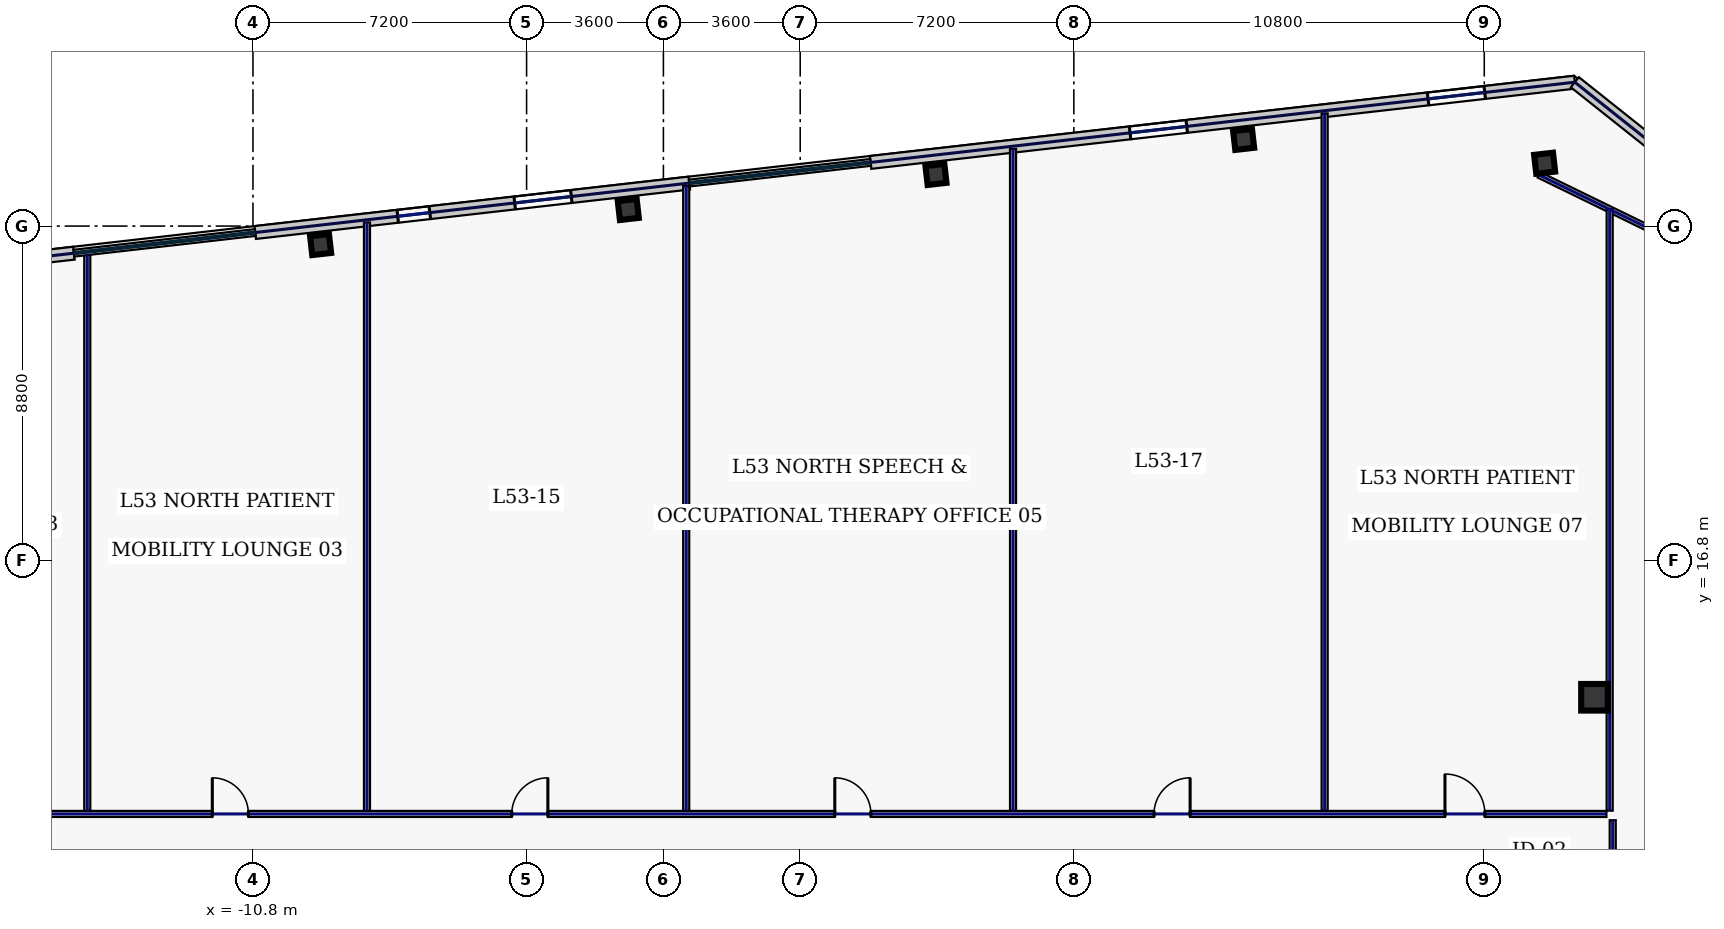
"""IFC4 building model, lengths in metres.
Left out: names, types, materials, properties, quantities, classifications, styles, units other than length and angle.
Written with IfcOpenShell. Run it as: python <this file> out.ifc"""

import sys

from ifc_helpers import new_model, si_unit, direction, frame, frame_2d, origin, origin_2d, place, context, subcontext, project, spatial, rectangle, hollow_rectangle, extrude, element, fill, save


model = new_model("IFC4")
c1 = context("Model", 3, precision=1e-05, world=origin(), true_north=direction((0.0, 1.0)))
c2 = subcontext(c1, "Body", "Model", "MODEL_VIEW")
j1 = project(units=[si_unit("LENGTHUNIT", "METRE"), si_unit("PLANEANGLEUNIT", "RADIAN")], contexts=[c1])
p1 = place(None, origin())
s1 = spatial("IfcSite", under=j1, at=p1, CompositionType="ELEMENT")
p2 = place(p1, origin())
s2 = spatial("IfcBuilding", under=s1, at=p2, CompositionType="ELEMENT")
p3 = place(p2, frame((0.0, 0.0, 230.2)))
s3 = spatial("IfcBuildingStorey", under=s2, at=p3, CompositionType="ELEMENT", Elevation=230.2)
p4 = place(p3, frame((24.5, 13.2, 0.0), z_axis=(0.0, 0.0, 1.0), x_axis=(1.0, 0.0, 0.0)))
e1 = element("IfcColumn", 1, at=p4, inside=s3, PredefinedType="COLUMN", context=c2, shape_type="SweptSolid", body=[
    extrude(hollow_rectangle(XDim=0.7, YDim=0.7, WallThickness=0.032, at=origin_2d()), origin(), (0.0, 0.0, 1.0), 3.74),
])
for number, where, z_axis, x_axis in (
    (2, (23.188, 27.253, 0.0), (0.0, 0.0, 1.0), (0.994, 0.113, 0.0)),
    (3, (15.269, 27.88, 0.0), (0.0, 0.0, 1.0), (0.994, 0.113, 0.0)),
    (4, (7.172, 26.958, 0.0), (0.0, 0.0, 1.0), (0.994, 0.113, 0.0)),
    (5, (-0.924, 26.035, 0.0), (0.0, 0.0, 1.0), (0.994, 0.113, 0.0)),
    (6, (-9.02, 25.113, 0.0), (0.0, 0.0, 1.0), (0.994, 0.113, 0.0)),
):
    element("IfcColumn", number, at=place(p3, frame(where, z_axis=z_axis, x_axis=x_axis)), inside=s3, PredefinedType="COLUMN", context=c2, shape_type="SweptSolid", body=[
        extrude(hollow_rectangle(XDim=0.5, YDim=0.5, WallThickness=0.025, at=origin_2d()), origin(), (0.0, 0.0, 1.0), 3.74),
    ])
p5 = place(p3, frame((23.983, 29.386, 0.0), z_axis=(0.0, 0.0, 1.0), x_axis=(-0.993572271362, -0.113199565282, 0.0)))
e7 = element("IfcWall", 7, at=p5, inside=s3, PredefinedType="STANDARD", context=c2, shape_type="SweptSolid", body=[
    extrude(rectangle(XDim=18.651, YDim=0.34, at=frame_2d((9.326, 0.0))), origin(), (0.0, 0.0, 1.0), 3.74),
])
p6 = place(p5, frame((10.279, 0.0, 0.83)))
e8 = element("IfcOpeningElement", 8, at=p6, cuts=e7, PredefinedType="OPENING", context=c2, shape_type="SweptSolid", body=[
    extrude(rectangle(XDim=1.5, YDim=2.0, at=frame_2d((0.75, 1.0))), frame((0.0, 0.18, 0.0), z_axis=(0.0, -1.0, 0.0), x_axis=(1.0, 0.0, 0.0)), (0.0, 0.0, 1.0), 0.36),
])
p7 = place(p5, frame((2.386, 0.0, 0.83)))
e9 = element("IfcOpeningElement", 9, at=p7, cuts=e7, PredefinedType="OPENING", context=c2, shape_type="SweptSolid", body=[
    extrude(rectangle(XDim=1.5, YDim=2.0, at=frame_2d((0.75, 1.0))), frame((0.0, 0.18, 0.0), z_axis=(0.0, -1.0, 0.0), x_axis=(1.0, 0.0, 0.0)), (0.0, 0.0, 1.0), 0.36),
])
p8 = place(p3, frame((0.682, 26.731, 0.0), z_axis=(0.0, 0.0, 1.0), x_axis=(-0.993571968199, -0.113202226169, 0.0)))
e10 = element("IfcWall", 10, at=p8, inside=s3, PredefinedType="STANDARD", context=c2, shape_type="SweptSolid", body=[
    extrude(rectangle(XDim=11.497, YDim=0.34, at=frame_2d((5.749, 0.0))), origin(), (0.0, 0.0, 1.0), 3.74),
])
p9 = place(p8, frame((6.873, 0.0, 0.83)))
e11 = element("IfcOpeningElement", 11, at=p9, cuts=e10, PredefinedType="OPENING", context=c2, shape_type="SweptSolid", body=[
    extrude(rectangle(XDim=0.85, YDim=1.85, at=frame_2d((0.425, 0.925))), frame((0.0, 0.18, 0.0), z_axis=(0.0, -1.0, 0.0), x_axis=(1.0, 0.0, 0.0)), (0.0, 0.0, 1.0), 0.36),
])
p10 = place(p8, frame((3.125, 0.0, 0.83)))
e12 = element("IfcOpeningElement", 12, at=p10, cuts=e10, PredefinedType="OPENING", context=c2, shape_type="SweptSolid", body=[
    extrude(rectangle(XDim=1.5, YDim=2.0, at=frame_2d((0.75, 1.0))), frame((0.0, 0.18, 0.0), z_axis=(0.0, -1.0, 0.0), x_axis=(1.0, 0.0, 0.0)), (0.0, 0.0, 1.0), 0.36),
])
p11 = place(p3, frame((-15.51, 24.886, 0.0), z_axis=(0.0, 0.0, 1.0), x_axis=(-0.993572271362, -0.113199565282, 0.0)))
e13 = element("IfcWall", 13, at=p11, inside=s3, PredefinedType="STANDARD", context=c2, shape_type="SweptSolid", body=[
    extrude(rectangle(XDim=18.651, YDim=0.34, at=frame_2d((9.326, 0.0))), origin(), (0.0, 0.0, 1.0), 3.74),
])
p12 = place(p11, frame((15.021, 0.0, 0.83)))
e14 = element("IfcOpeningElement", 14, at=p12, cuts=e13, PredefinedType="OPENING", context=c2, shape_type="SweptSolid", body=[
    extrude(rectangle(XDim=1.5, YDim=2.0, at=frame_2d((0.75, 1.0))), frame((0.0, 0.18, 0.0), z_axis=(0.0, -1.0, 0.0), x_axis=(1.0, 0.0, 0.0)), (0.0, 0.0, 1.0), 0.36),
])
p13 = place(p11, frame((11.273, 0.0, 0.83)))
e15 = element("IfcOpeningElement", 15, at=p13, cuts=e13, PredefinedType="OPENING", context=c2, shape_type="SweptSolid", body=[
    extrude(rectangle(XDim=1.5, YDim=2.0, at=frame_2d((0.75, 1.0))), frame((0.0, 0.18, 0.0), z_axis=(0.0, -1.0, 0.0), x_axis=(1.0, 0.0, 0.0)), (0.0, 0.0, 1.0), 0.36),
])
p14 = place(p11, frame((6.873, 0.0, 0.83)))
e16 = element("IfcOpeningElement", 16, at=p14, cuts=e13, PredefinedType="OPENING", context=c2, shape_type="SweptSolid", body=[
    extrude(rectangle(XDim=1.5, YDim=2.0, at=frame_2d((0.75, 1.0))), frame((0.0, 0.18, 0.0), z_axis=(0.0, -1.0, 0.0), x_axis=(1.0, 0.0, 0.0)), (0.0, 0.0, 1.0), 0.36),
])
p15 = place(p11, frame((3.125, 0.0, 0.83)))
e17 = element("IfcOpeningElement", 17, at=p15, cuts=e13, PredefinedType="OPENING", context=c2, shape_type="SweptSolid", body=[
    extrude(rectangle(XDim=0.85, YDim=1.85, at=frame_2d((0.425, 0.925))), frame((0.0, 0.18, 0.0), z_axis=(0.0, -1.0, 0.0), x_axis=(1.0, 0.0, 0.0)), (0.0, 0.0, 1.0), 0.36),
])
p16 = place(p3, frame((29.107, 25.31, 0.0), z_axis=(0.0, 0.0, 1.0), x_axis=(-0.78259733853, 0.62252823689, 0.0)))
e18 = element("IfcWall", 18, at=p16, inside=s3, PredefinedType="STANDARD", context=c2, shape_type="SweptSolid", body=[
    extrude(rectangle(XDim=6.548, YDim=0.34, at=frame_2d((3.274, 0.0))), origin(), (0.0, 0.0, 1.0), 3.74),
])
p17 = place(p3, frame((28.528, 24.271, 0.0), z_axis=(0.0, 0.0, 1.0), x_axis=(-0.898820692789, 0.438316509173, 0.0)))
e19 = element("IfcWall", 19, at=p17, inside=s3, PredefinedType="PARTITIONING", context=c2, shape_type="SweptSolid", body=[
    extrude(rectangle(XDim=6.107, YDim=0.16, at=frame_2d((3.053, 0.0))), origin(), (0.0, 0.0, 1.0), 3.74),
])
p18 = place(p3, frame((-24.815, 10.13, 0.0), z_axis=(0.0, 0.0, 1.0), x_axis=(1.0, 0.0, 0.0)))
e20 = element("IfcWall", 20, at=p18, inside=s3, PredefinedType="PARTITIONING", context=c2, shape_type="SweptSolid", body=[
    extrude(rectangle(XDim=49.63, YDim=0.16, at=frame_2d((24.815, 0.0))), origin(), (0.0, 0.0, 1.0), 3.74),
])
p19 = place(p18, frame((2.044, 0.0, 0.0)))
e21 = element("IfcOpeningElement", 21, at=p19, cuts=e20, PredefinedType="OPENING", context=c2, shape_type="SweptSolid", body=[
    extrude(rectangle(XDim=0.95, YDim=2.2, at=frame_2d((0.475, 1.1))), frame((0.0, 0.09, 0.0), z_axis=(0.0, -1.0, 0.0), x_axis=(1.0, 0.0, 0.0)), (0.0, 0.0, 1.0), 0.18),
])
p20 = place(p18, frame((6.72, 0.0, 0.0)))
e22 = element("IfcOpeningElement", 22, at=p20, cuts=e20, PredefinedType="OPENING", context=c2, shape_type="SweptSolid", body=[
    extrude(rectangle(XDim=1.05, YDim=2.2, at=frame_2d((0.525, 1.1))), frame((0.0, 0.09, 0.0), z_axis=(0.0, -1.0, 0.0), x_axis=(1.0, 0.0, 0.0)), (0.0, 0.0, 1.0), 0.18),
])
p21 = place(p18, frame((12.945, 0.0, 0.0)))
e23 = element("IfcOpeningElement", 23, at=p21, cuts=e20, PredefinedType="OPENING", context=c2, shape_type="SweptSolid", body=[
    extrude(rectangle(XDim=0.95, YDim=2.2, at=frame_2d((0.475, 1.1))), frame((0.0, 0.09, 0.0), z_axis=(0.0, -1.0, 0.0), x_axis=(1.0, 0.0, 0.0)), (0.0, 0.0, 1.0), 0.18),
])
p22 = place(p18, frame((20.825, 0.0, 0.0)))
e24 = element("IfcOpeningElement", 24, at=p22, cuts=e20, PredefinedType="OPENING", context=c2, shape_type="SweptSolid", body=[
    extrude(rectangle(XDim=0.95, YDim=2.2, at=frame_2d((0.475, 1.1))), frame((0.0, 0.09, 0.0), z_axis=(0.0, -1.0, 0.0), x_axis=(1.0, 0.0, 0.0)), (0.0, 0.0, 1.0), 0.18),
])
p23 = place(p18, frame((29.325, 0.0, 0.0)))
e25 = element("IfcOpeningElement", 25, at=p23, cuts=e20, PredefinedType="OPENING", context=c2, shape_type="SweptSolid", body=[
    extrude(rectangle(XDim=0.95, YDim=2.2, at=frame_2d((0.475, 1.1))), frame((0.0, 0.09, 0.0), z_axis=(0.0, -1.0, 0.0), x_axis=(1.0, 0.0, 0.0)), (0.0, 0.0, 1.0), 0.18),
])
p24 = place(p18, frame((37.725, 0.0, 0.0)))
e26 = element("IfcOpeningElement", 26, at=p24, cuts=e20, PredefinedType="OPENING", context=c2, shape_type="SweptSolid", body=[
    extrude(rectangle(XDim=0.95, YDim=2.2, at=frame_2d((0.475, 1.1))), frame((0.0, 0.09, 0.0), z_axis=(0.0, -1.0, 0.0), x_axis=(1.0, 0.0, 0.0)), (0.0, 0.0, 1.0), 0.18),
])
p25 = place(p18, frame((45.381, 0.0, 0.0)))
e27 = element("IfcOpeningElement", 27, at=p25, cuts=e20, PredefinedType="OPENING", context=c2, shape_type="SweptSolid", body=[
    extrude(rectangle(XDim=1.05, YDim=2.2, at=frame_2d((0.525, 1.1))), frame((0.0, 0.09, 0.0), z_axis=(0.0, -1.0, 0.0), x_axis=(1.0, 0.0, 0.0)), (0.0, 0.0, 1.0), 0.18),
])
p26 = place(p3, frame((24.98, 9.965, 0.0), z_axis=(0.0, 0.0, 1.0), x_axis=(0.0, -1.0, 0.0)))
e28 = element("IfcWall", 28, at=p26, inside=s3, PredefinedType="PARTITIONING", context=c2, shape_type="SweptSolid", body=[
    extrude(rectangle(XDim=2.98, YDim=0.16, at=frame_2d((1.49, 0.0))), origin(), (0.0, 0.0, 1.0), 3.74),
])
p27 = place(p26, frame((1.1, 0.0, 0.0)))
e29 = element("IfcOpeningElement", 29, at=p27, cuts=e28, PredefinedType="OPENING", context=c2, shape_type="SweptSolid", body=[
    extrude(rectangle(XDim=0.95, YDim=2.2, at=frame_2d((0.475, 1.1))), frame((0.0, 0.09, 0.0), z_axis=(0.0, -1.0, 0.0), x_axis=(1.0, 0.0, 0.0)), (0.0, 0.0, 1.0), 0.18),
])
p28 = place(p3, frame((24.9, 10.215, 0.0), z_axis=(0.0, 0.0, 1.0), x_axis=(0.0, 1.0, 0.0)))
e30 = element("IfcWall", 30, at=p28, inside=s3, PredefinedType="PARTITIONING", context=c2, shape_type="SweptSolid", body=[
    extrude(rectangle(XDim=15.829, YDim=0.16, at=frame_2d((7.915, 0.0))), origin(), (0.0, 0.0, 1.0), 3.74),
])
p29 = place(p3, frame((-15.16, 10.215, 0.0), z_axis=(0.0, 0.0, 1.0), x_axis=(0.0, 1.0, 0.0)))
e31 = element("IfcWall", 31, at=p29, inside=s3, PredefinedType="PARTITIONING", context=c2, shape_type="SweptSolid", body=[
    extrude(rectangle(XDim=14.641, YDim=0.16, at=frame_2d((7.32, 0.0))), origin(), (0.0, 0.0, 1.0), 3.74),
])
p30 = place(p3, frame((-7.8, 10.215, 0.0), z_axis=(0.0, 0.0, 1.0), x_axis=(0.0, 1.0, 0.0)))
e32 = element("IfcWall", 32, at=p30, inside=s3, PredefinedType="PARTITIONING", context=c2, shape_type="SweptSolid", body=[
    extrude(rectangle(XDim=15.479, YDim=0.16, at=frame_2d((7.74, 0.0))), origin(), (0.0, 0.0, 1.0), 3.74),
])
p31 = place(p3, frame((0.6, 10.215, 0.0), z_axis=(0.0, 0.0, 1.0), x_axis=(0.0, 1.0, 0.0)))
e33 = element("IfcWall", 33, at=p31, inside=s3, PredefinedType="PARTITIONING", context=c2, shape_type="SweptSolid", body=[
    extrude(rectangle(XDim=16.437, YDim=0.16, at=frame_2d((8.218, 0.0))), origin(), (0.0, 0.0, 1.0), 3.74),
])
p32 = place(p3, frame((9.2, 10.215, 0.0), z_axis=(0.0, 0.0, 1.0), x_axis=(0.0, 1.0, 0.0)))
e34 = element("IfcWall", 34, at=p32, inside=s3, PredefinedType="PARTITIONING", context=c2, shape_type="SweptSolid", body=[
    extrude(rectangle(XDim=17.417, YDim=0.16, at=frame_2d((8.708, 0.0))), origin(), (0.0, 0.0, 1.0), 3.74),
])
p33 = place(p3, frame((17.4, 10.215, 0.0), z_axis=(0.0, 0.0, 1.0), x_axis=(0.0, 1.0, 0.0)))
e35 = element("IfcWall", 35, at=p33, inside=s3, PredefinedType="PARTITIONING", context=c2, shape_type="SweptSolid", body=[
    extrude(rectangle(XDim=18.351, YDim=0.16, at=frame_2d((9.175, 0.0))), origin(), (0.0, 0.0, 1.0), 3.74),
])
p34 = place(p6, origin())
e36 = element("IfcWindow", 36, at=p34, inside=s3, PartitioningType="SINGLE_PANEL", PredefinedType="WINDOW", context=c2, shape_type="SweptSolid", body=[
    extrude(rectangle(XDim=1.5, YDim=2.0, at=frame_2d((0.75, 1.0))), frame((0.0, 0.03, 0.0), z_axis=(0.0, -1.0, 0.0), x_axis=(1.0, 0.0, 0.0)), (0.0, 0.0, 1.0), 0.06),
])
fill(e8, e36)
p35 = place(p7, origin())
e37 = element("IfcWindow", 37, at=p35, inside=s3, PartitioningType="SINGLE_PANEL", PredefinedType="WINDOW", context=c2, shape_type="SweptSolid", body=[
    extrude(rectangle(XDim=1.5, YDim=2.0, at=frame_2d((0.75, 1.0))), frame((0.0, 0.03, 0.0), z_axis=(0.0, -1.0, 0.0), x_axis=(1.0, 0.0, 0.0)), (0.0, 0.0, 1.0), 0.06),
])
fill(e9, e37)
p36 = place(p9, origin())
e38 = element("IfcWindow", 38, at=p36, inside=s3, PartitioningType="SINGLE_PANEL", PredefinedType="WINDOW", context=c2, shape_type="SweptSolid", body=[
    extrude(rectangle(XDim=0.85, YDim=1.85, at=frame_2d((0.425, 0.925))), frame((0.0, 0.03, 0.0), z_axis=(0.0, -1.0, 0.0), x_axis=(1.0, 0.0, 0.0)), (0.0, 0.0, 1.0), 0.06),
])
fill(e11, e38)
p37 = place(p10, origin())
e39 = element("IfcWindow", 39, at=p37, inside=s3, PartitioningType="SINGLE_PANEL", PredefinedType="WINDOW", context=c2, shape_type="SweptSolid", body=[
    extrude(rectangle(XDim=1.5, YDim=2.0, at=frame_2d((0.75, 1.0))), frame((0.0, 0.03, 0.0), z_axis=(0.0, -1.0, 0.0), x_axis=(1.0, 0.0, 0.0)), (0.0, 0.0, 1.0), 0.06),
])
fill(e12, e39)
p38 = place(p21, origin())
e40 = element("IfcDoor", 40, at=p38, inside=s3, OperationType="SINGLE_SWING_LEFT", PredefinedType="DOOR", context=c2, shape_type="SweptSolid", body=[
    extrude(rectangle(XDim=0.95, YDim=2.2, at=frame_2d((0.475, 1.1))), frame((0.0, 0.025, 0.0), z_axis=(0.0, -1.0, 0.0), x_axis=(1.0, 0.0, 0.0)), (0.0, 0.0, 1.0), 0.05),
])
fill(e23, e40)
p39 = place(p22, origin())
e41 = element("IfcDoor", 41, at=p39, inside=s3, OperationType="SINGLE_SWING_RIGHT", PredefinedType="DOOR", context=c2, shape_type="SweptSolid", body=[
    extrude(rectangle(XDim=0.95, YDim=2.2, at=frame_2d((0.475, 1.1))), frame((0.0, 0.025, 0.0), z_axis=(0.0, -1.0, 0.0), x_axis=(1.0, 0.0, 0.0)), (0.0, 0.0, 1.0), 0.05),
])
fill(e24, e41)
p40 = place(p23, origin())
e42 = element("IfcDoor", 42, at=p40, inside=s3, OperationType="SINGLE_SWING_LEFT", PredefinedType="DOOR", context=c2, shape_type="SweptSolid", body=[
    extrude(rectangle(XDim=0.95, YDim=2.2, at=frame_2d((0.475, 1.1))), frame((0.0, 0.025, 0.0), z_axis=(0.0, -1.0, 0.0), x_axis=(1.0, 0.0, 0.0)), (0.0, 0.0, 1.0), 0.05),
])
fill(e25, e42)
p41 = place(p24, origin())
e43 = element("IfcDoor", 43, at=p41, inside=s3, OperationType="SINGLE_SWING_RIGHT", PredefinedType="DOOR", context=c2, shape_type="SweptSolid", body=[
    extrude(rectangle(XDim=0.95, YDim=2.2, at=frame_2d((0.475, 1.1))), frame((0.0, 0.025, 0.0), z_axis=(0.0, -1.0, 0.0), x_axis=(1.0, 0.0, 0.0)), (0.0, 0.0, 1.0), 0.05),
])
fill(e26, e43)
p42 = place(p25, origin())
e44 = element("IfcDoor", 44, at=p42, inside=s3, OperationType="SINGLE_SWING_LEFT", PredefinedType="DOOR", context=c2, shape_type="SweptSolid", body=[
    extrude(rectangle(XDim=1.05, YDim=2.2, at=frame_2d((0.525, 1.1))), frame((0.0, 0.025, 0.0), z_axis=(0.0, -1.0, 0.0), x_axis=(1.0, 0.0, 0.0)), (0.0, 0.0, 1.0), 0.05),
])
fill(e27, e44)
save(model, sys.argv[1])
